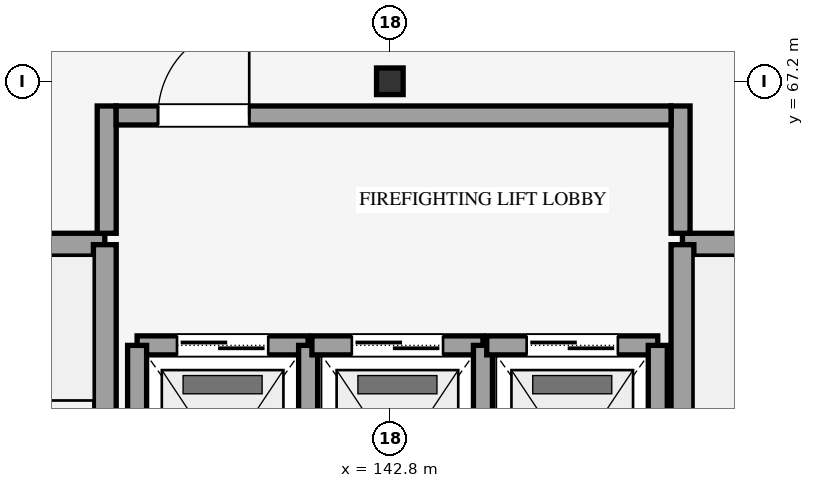
"""IFC4 building model, lengths in metres.
Left out: names, types, materials, properties, quantities, classifications, styles, units other than length and angle.
Written with IfcOpenShell. Run it as: python <this file> out.ifc"""

import sys

from ifc_helpers import new_model, si_unit, direction, frame, frame_2d, origin, origin_2d, place, context, subcontext, project, spatial, rectangle, i_section, extrude, element, fill, save


model = new_model("IFC4")
c1 = context("Model", 3, precision=1e-05, world=origin(), true_north=direction((0.0, 1.0)))
c2 = subcontext(c1, "Body", "Model", "MODEL_VIEW")
j1 = project(units=[si_unit("LENGTHUNIT", "METRE"), si_unit("PLANEANGLEUNIT", "RADIAN")], contexts=[c1])
p1 = place(None, origin())
s1 = spatial("IfcSite", under=j1, at=p1, CompositionType="ELEMENT")
p2 = place(p1, origin())
s2 = spatial("IfcBuilding", under=s1, at=p2, CompositionType="ELEMENT")
p3 = place(p2, frame((0.0, 0.0, 48.9)))
s3 = spatial("IfcBuildingStorey", under=s2, at=p3, CompositionType="ELEMENT", Elevation=48.9)
p4 = place(p3, frame((142.8, 67.2, 0.0), z_axis=(0.0, 0.0, 1.0), x_axis=(1.0, 0.0, 0.0)))
e1 = element("IfcColumn", 1, at=p4, inside=s3, PredefinedType="COLUMN", context=c2, shape_type="SweptSolid", body=[
    extrude(i_section(OverallWidth=0.35, OverallDepth=0.35, WebThickness=0.012, FlangeThickness=0.019, FilletRadius=0.02, at=origin_2d()), origin(), (0.0, 0.0, 1.0), 4.2),
])
p5 = place(p3, frame((135.05, 65.05, 0.0), z_axis=(0.0, 0.0, 1.0), x_axis=(1.0, 0.0, 0.0)))
e2 = element("IfcWall", 2, at=p5, inside=s3, PredefinedType="SHEAR", context=c2, shape_type="SweptSolid", body=[
    extrude(rectangle(XDim=4.0, YDim=0.3, at=frame_2d((2.0, 0.0))), origin(), (0.0, 0.0, 1.0), 4.2),
])
p6 = place(p3, frame((139.05, 50.75, 0.0), z_axis=(0.0, 0.0, 1.0), x_axis=(0.0, 1.0, 0.0)))
e3 = element("IfcWall", 3, at=p6, inside=s3, PredefinedType="SHEAR", context=c2, shape_type="SweptSolid", body=[
    extrude(rectangle(XDim=14.3, YDim=0.3, at=frame_2d((7.15, 0.0))), origin(), (0.0, 0.0, 1.0), 4.2),
])
p7 = place(p3, frame((146.65, 65.05, 0.0), z_axis=(0.0, 0.0, 1.0), x_axis=(1.0, 0.0, 0.0)))
e4 = element("IfcWall", 4, at=p7, inside=s3, PredefinedType="SHEAR", context=c2, shape_type="SweptSolid", body=[
    extrude(rectangle(XDim=4.0, YDim=0.3, at=frame_2d((2.0, 0.0))), origin(), (0.0, 0.0, 1.0), 4.2),
])
p8 = place(p3, frame((146.65, 50.75, 0.0), z_axis=(0.0, 0.0, 1.0), x_axis=(0.0, 1.0, 0.0)))
e5 = element("IfcWall", 5, at=p8, inside=s3, PredefinedType="SHEAR", context=c2, shape_type="SweptSolid", body=[
    extrude(rectangle(XDim=14.3, YDim=0.3, at=frame_2d((7.15, 0.0))), origin(), (0.0, 0.0, 1.0), 4.2),
])
p9 = place(p3, frame((139.475, 63.725, 0.0), z_axis=(0.0, 0.0, 1.0), x_axis=(1.0, 0.0, 0.0)))
e6 = element("IfcWall", 6, at=p9, inside=s3, PredefinedType="SHEAR", context=c2, shape_type="SweptSolid", body=[
    extrude(rectangle(XDim=2.25, YDim=0.25, at=frame_2d((1.125, 0.0))), origin(), (0.0, 0.0, 1.0), 3.96),
])
p10 = place(p9, frame((0.525, 0.0, 0.0)))
e7 = element("IfcOpeningElement", 7, at=p10, cuts=e6, PredefinedType="OPENING", context=c2, shape_type="SweptSolid", body=[
    extrude(rectangle(XDim=1.2, YDim=2.18, at=frame_2d((0.6, 1.09))), frame((0.0, 0.135, 0.0), z_axis=(0.0, -1.0, 0.0), x_axis=(1.0, 0.0, 0.0)), (0.0, 0.0, 1.0), 0.27),
])
for number, where, z_axis, x_axis in (
    (8, (139.475, 60.675, 0.0), (0.0, 0.0, 1.0), (0.0, 1.0, 0.0)),
    (9, (141.725, 60.675, 0.0), (0.0, 0.0, 1.0), (0.0, 1.0, 0.0)),
):
    element("IfcWall", number, at=place(p3, frame(where, z_axis=z_axis, x_axis=x_axis)), inside=s3, PredefinedType="SHEAR", context=c2, shape_type="SweptSolid", body=[
        extrude(rectangle(XDim=3.05, YDim=0.25, at=frame_2d((1.525, 0.0))), origin(), (0.0, 0.0, 1.0), 3.96),
    ])
p11 = place(p3, frame((141.775, 63.725, 0.0), z_axis=(0.0, 0.0, 1.0), x_axis=(1.0, 0.0, 0.0)))
e10 = element("IfcWall", 10, at=p11, inside=s3, PredefinedType="SHEAR", context=c2, shape_type="SweptSolid", body=[
    extrude(rectangle(XDim=2.25, YDim=0.25, at=frame_2d((1.125, 0.0))), origin(), (0.0, 0.0, 1.0), 3.96),
])
p12 = place(p11, frame((0.525, 0.0, 0.0)))
e11 = element("IfcOpeningElement", 11, at=p12, cuts=e10, PredefinedType="OPENING", context=c2, shape_type="SweptSolid", body=[
    extrude(rectangle(XDim=1.2, YDim=2.18, at=frame_2d((0.6, 1.09))), frame((0.0, 0.135, 0.0), z_axis=(0.0, -1.0, 0.0), x_axis=(1.0, 0.0, 0.0)), (0.0, 0.0, 1.0), 0.27),
])
p13 = place(p3, frame((144.025, 60.675, 0.0), z_axis=(0.0, 0.0, 1.0), x_axis=(0.0, 1.0, 0.0)))
e12 = element("IfcWall", 12, at=p13, inside=s3, PredefinedType="SHEAR", context=c2, shape_type="SweptSolid", body=[
    extrude(rectangle(XDim=3.05, YDim=0.25, at=frame_2d((1.525, 0.0))), origin(), (0.0, 0.0, 1.0), 3.96),
])
p14 = place(p3, frame((144.075, 63.725, 0.0), z_axis=(0.0, 0.0, 1.0), x_axis=(1.0, 0.0, 0.0)))
e13 = element("IfcWall", 13, at=p14, inside=s3, PredefinedType="SHEAR", context=c2, shape_type="SweptSolid", body=[
    extrude(rectangle(XDim=2.25, YDim=0.25, at=frame_2d((1.125, 0.0))), origin(), (0.0, 0.0, 1.0), 3.96),
])
p15 = place(p14, frame((0.525, 0.0, 0.0)))
e14 = element("IfcOpeningElement", 14, at=p15, cuts=e13, PredefinedType="OPENING", context=c2, shape_type="SweptSolid", body=[
    extrude(rectangle(XDim=1.2, YDim=2.18, at=frame_2d((0.6, 1.09))), frame((0.0, 0.135, 0.0), z_axis=(0.0, -1.0, 0.0), x_axis=(1.0, 0.0, 0.0)), (0.0, 0.0, 1.0), 0.27),
])
p16 = place(p3, frame((146.325, 60.675, 0.0), z_axis=(0.0, 0.0, 1.0), x_axis=(0.0, 1.0, 0.0)))
e15 = element("IfcWall", 15, at=p16, inside=s3, PredefinedType="SHEAR", context=c2, shape_type="SweptSolid", body=[
    extrude(rectangle(XDim=3.05, YDim=0.25, at=frame_2d((1.525, 0.0))), origin(), (0.0, 0.0, 1.0), 3.96),
])
for number, where, z_axis, x_axis in (
    (16, (139.075, 65.2, 0.0), (0.0, 0.0, 1.0), (0.0, 1.0, 0.0)),
    (17, (146.625, 65.2, 0.0), (0.0, 0.0, 1.0), (0.0, 1.0, 0.0)),
):
    element("IfcWall", number, at=place(p3, frame(where, z_axis=z_axis, x_axis=x_axis)), inside=s3, PredefinedType="SHEAR", context=c2, shape_type="SweptSolid", body=[
        extrude(rectangle(XDim=1.675, YDim=0.25, at=frame_2d((0.837, 0.0))), origin(), (0.0, 0.0, 1.0), 3.96),
    ])
p17 = place(p3, frame((139.2, 66.75, 0.0), z_axis=(0.0, 0.0, 1.0), x_axis=(1.0, 0.0, 0.0)))
e18 = element("IfcWall", 18, at=p17, inside=s3, PredefinedType="SHEAR", context=c2, shape_type="SweptSolid", body=[
    extrude(rectangle(XDim=7.3, YDim=0.25, at=frame_2d((3.65, 0.0))), origin(), (0.0, 0.0, 1.0), 3.96),
])
p18 = place(p17, frame((0.55, 0.0, 0.0)))
e19 = element("IfcOpeningElement", 19, at=p18, cuts=e18, PredefinedType="OPENING", context=c2, shape_type="SweptSolid", body=[
    extrude(rectangle(XDim=1.2, YDim=2.15, at=frame_2d((0.6, 1.075))), frame((0.0, 0.135, 0.0), z_axis=(0.0, -1.0, 0.0), x_axis=(1.0, 0.0, 0.0)), (0.0, 0.0, 1.0), 0.27),
])
p19 = place(p10, origin())
e20 = element("IfcDoor", 20, at=p19, inside=s3, OperationType="DOUBLE_DOOR_SLIDING", PredefinedType="DOOR", context=c2, shape_type="SweptSolid", body=[
    extrude(rectangle(XDim=1.2, YDim=2.18, at=frame_2d((0.6, 1.09))), frame((0.0, 0.025, 0.0), z_axis=(0.0, -1.0, 0.0), x_axis=(1.0, 0.0, 0.0)), (0.0, 0.0, 1.0), 0.05),
])
fill(e7, e20)
p20 = place(p12, origin())
e21 = element("IfcDoor", 21, at=p20, inside=s3, OperationType="DOUBLE_DOOR_SLIDING", PredefinedType="DOOR", context=c2, shape_type="SweptSolid", body=[
    extrude(rectangle(XDim=1.2, YDim=2.18, at=frame_2d((0.6, 1.09))), frame((0.0, 0.025, 0.0), z_axis=(0.0, -1.0, 0.0), x_axis=(1.0, 0.0, 0.0)), (0.0, 0.0, 1.0), 0.05),
])
fill(e11, e21)
p21 = place(p15, origin())
e22 = element("IfcDoor", 22, at=p21, inside=s3, OperationType="DOUBLE_DOOR_SLIDING", PredefinedType="DOOR", context=c2, shape_type="SweptSolid", body=[
    extrude(rectangle(XDim=1.2, YDim=2.18, at=frame_2d((0.6, 1.09))), frame((0.0, 0.025, 0.0), z_axis=(0.0, -1.0, 0.0), x_axis=(1.0, 0.0, 0.0)), (0.0, 0.0, 1.0), 0.05),
])
fill(e14, e22)
p22 = place(p18, origin())
e23 = element("IfcDoor", 23, at=p22, inside=s3, OperationType="SINGLE_SWING_RIGHT", PredefinedType="DOOR", context=c2, shape_type="SweptSolid", body=[
    extrude(rectangle(XDim=1.2, YDim=2.15, at=frame_2d((0.6, 1.075))), frame((0.0, 0.025, 0.0), z_axis=(0.0, -1.0, 0.0), x_axis=(1.0, 0.0, 0.0)), (0.0, 0.0, 1.0), 0.05),
])
fill(e19, e23)
save(model, sys.argv[1])
